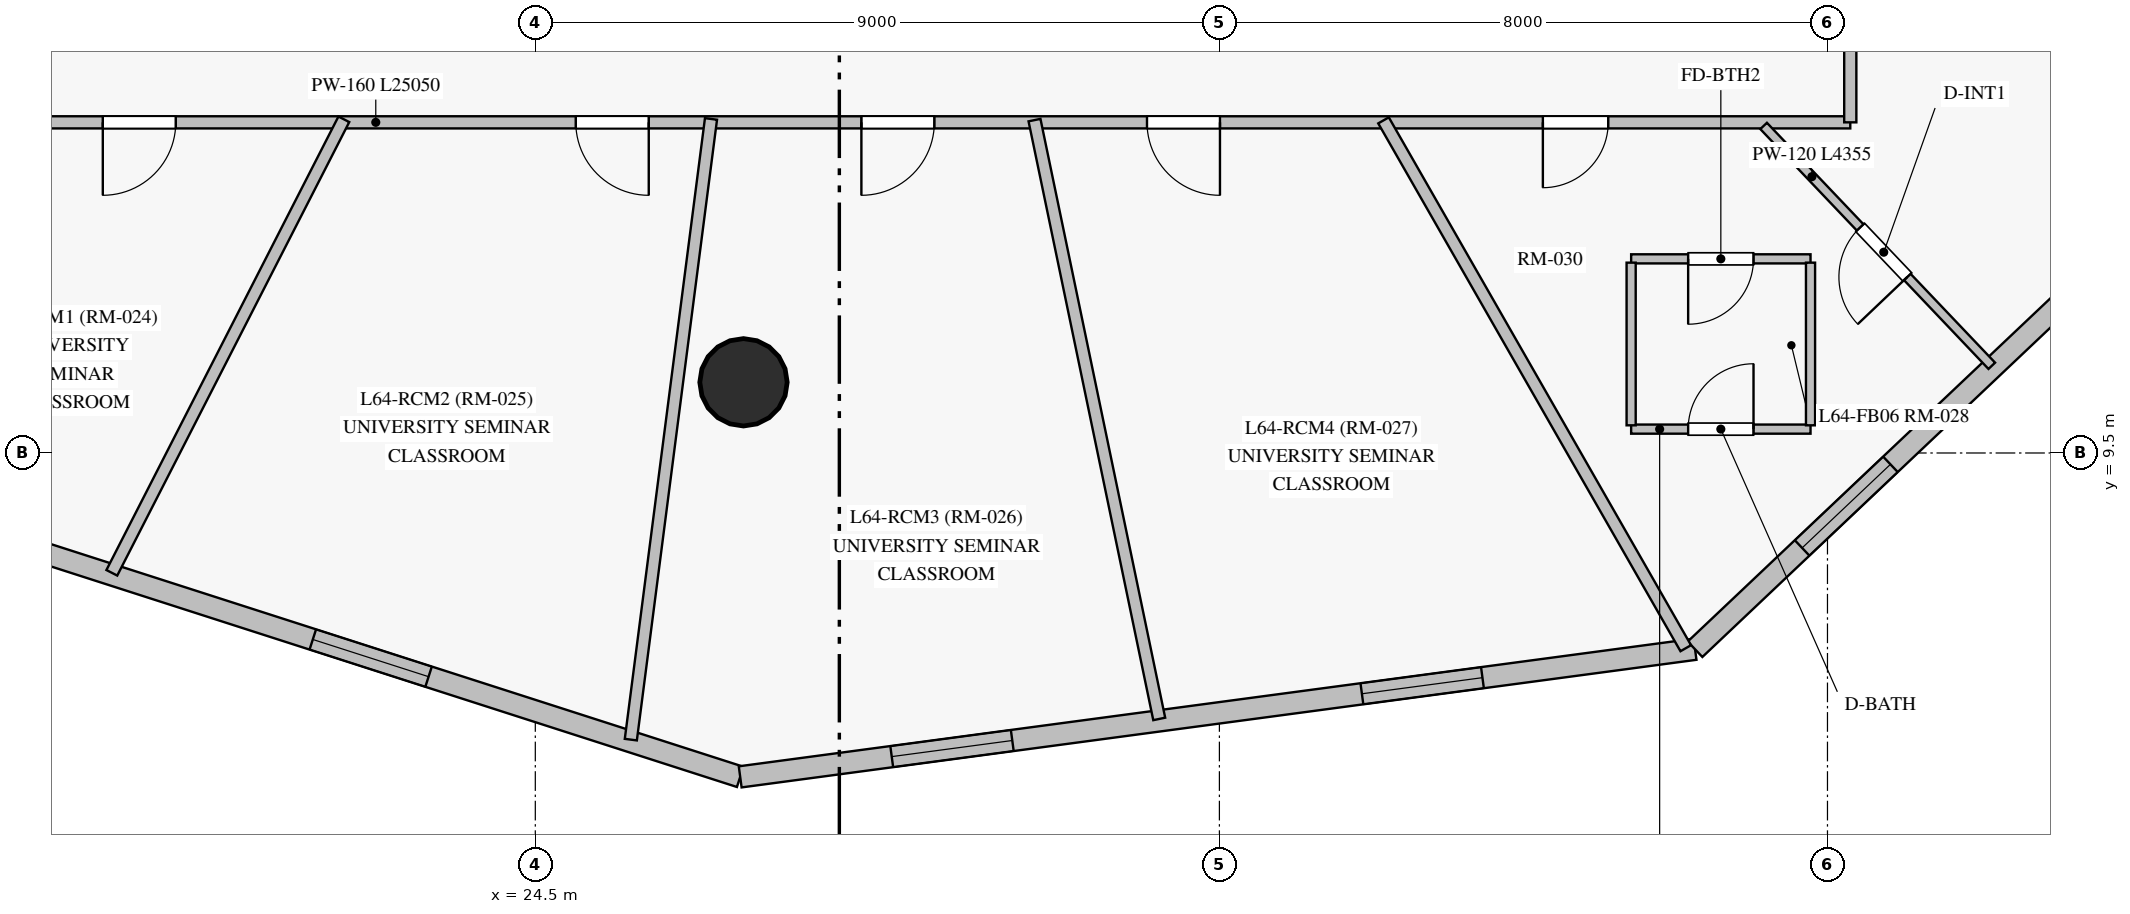
"""IFC4 building model, lengths in metres.
Left out: names, types, materials, properties, quantities, classifications, styles, units other than length and angle.
Written with IfcOpenShell. Run it as: python <this file> out.ifc"""

import sys

from ifc_helpers import new_model, si_unit, direction, frame, frame_2d, origin, origin_with_axes, origin_2d, place, context, subcontext, project, spatial, rectangle, circle, extrude, source, transform, mapped, element, fill, save


model = new_model("IFC4")
c1 = context("Model", 3, precision=1e-05, world=origin(), true_north=direction((0.0, 1.0)))
c2 = subcontext(c1, "Body", "Model", "MODEL_VIEW")
j1 = project(units=[si_unit("LENGTHUNIT", "METRE"), si_unit("PLANEANGLEUNIT", "RADIAN")], contexts=[c1])
p1 = place(None, origin())
s1 = spatial("IfcSite", under=j1, at=p1, CompositionType="ELEMENT")
p2 = place(p1, origin())
s2 = spatial("IfcBuilding", under=s1, at=p2, CompositionType="ELEMENT")
p3 = place(p2, frame((0.0, 0.0, 219.95)))
s3 = spatial("IfcBuildingStorey", under=s2, at=p3, CompositionType="ELEMENT", Elevation=219.95)
m1 = source(origin_with_axes(), c2, "Body", "SweptSolid", [
    extrude(circle(Radius=0.575, at=origin_2d()), origin(), (0.0, 0.0, 1.0), 3.05),
])
p4 = place(p3, frame((27.239, 10.43, 0.0), z_axis=(0.0, 0.0, 1.0), x_axis=(1.0, 0.0, 0.0)))
e1 = element("IfcColumn", 1, at=p4, inside=s3, PredefinedType="COLUMN", context=c2, shape_type="MappedRepresentation", body=[
    mapped(m1, transform((0.0, 0.0, 0.0), scale=1.0)),
])
p5 = place(p3, frame((18.019, 8.189, 0.0), z_axis=(0.0, 0.0, 1.0), x_axis=(0.95200774136, -0.306073945951, 0.0)))
e2 = element("IfcWall", 2, at=p5, inside=s3, PredefinedType="SOLIDWALL", context=c2, shape_type="SweptSolid", body=[
    extrude(rectangle(XDim=9.64, YDim=0.28, at=frame_2d((4.82, 0.0))), origin(), (0.0, 0.0, 1.0), 2.85),
])
p6 = place(p5, frame((3.733, 0.0, 0.85)))
e3 = element("IfcOpeningElement", 3, at=p6, cuts=e2, PredefinedType="OPENING", context=c2, shape_type="SweptSolid", body=[
    extrude(rectangle(XDim=1.6, YDim=1.6, at=frame_2d((0.8, 0.8))), frame((0.0, 0.15, 0.0), z_axis=(0.0, -1.0, 0.0), x_axis=(1.0, 0.0, 0.0)), (0.0, 0.0, 1.0), 0.3),
])
p7 = place(p3, frame((27.196, 5.239, 0.0), z_axis=(0.0, 0.0, 1.0), x_axis=(0.991186634331, 0.132472849758, 0.0)))
e4 = element("IfcWall", 4, at=p7, inside=s3, PredefinedType="SOLIDWALL", context=c2, shape_type="SweptSolid", body=[
    extrude(rectangle(XDim=12.674, YDim=0.28, at=frame_2d((6.337, 0.0))), origin(), (0.0, 0.0, 1.0), 2.85),
])
p8 = place(p7, frame((2.011, 0.0, 0.85)))
e5 = element("IfcOpeningElement", 5, at=p8, cuts=e4, PredefinedType="OPENING", context=c2, shape_type="SweptSolid", body=[
    extrude(rectangle(XDim=1.6, YDim=1.6, at=frame_2d((0.8, 0.8))), frame((0.0, 0.15, 0.0), z_axis=(0.0, -1.0, 0.0), x_axis=(1.0, 0.0, 0.0)), (0.0, 0.0, 1.0), 0.3),
])
p9 = place(p7, frame((8.252, 0.0, 0.85)))
e6 = element("IfcOpeningElement", 6, at=p9, cuts=e4, PredefinedType="OPENING", context=c2, shape_type="SweptSolid", body=[
    extrude(rectangle(XDim=1.6, YDim=1.6, at=frame_2d((0.8, 0.8))), frame((0.0, 0.15, 0.0), z_axis=(0.0, -1.0, 0.0), x_axis=(1.0, 0.0, 0.0)), (0.0, 0.0, 1.0), 0.3),
])
p10 = place(p3, frame((39.758, 6.918, 0.0), z_axis=(0.0, 0.0, 1.0), x_axis=(0.726306750321, 0.687370718345, 0.0)))
e7 = element("IfcWall", 7, at=p10, inside=s3, PredefinedType="SOLIDWALL", context=c2, shape_type="SweptSolid", body=[
    extrude(rectangle(XDim=9.619, YDim=0.28, at=frame_2d((4.809, 0.0))), origin(), (0.0, 0.0, 1.0), 2.85),
])
p11 = place(p10, frame((1.939, 0.0, 0.85)))
e8 = element("IfcOpeningElement", 8, at=p11, cuts=e7, PredefinedType="OPENING", context=c2, shape_type="SweptSolid", body=[
    extrude(rectangle(XDim=1.6, YDim=1.6, at=frame_2d((0.8, 0.8))), frame((0.0, 0.15, 0.0), z_axis=(0.0, -1.0, 0.0), x_axis=(1.0, 0.0, 0.0)), (0.0, 0.0, 1.0), 0.3),
])
p12 = place(p10, frame((6.669, 0.0, 0.85)))
e9 = element("IfcOpeningElement", 9, at=p12, cuts=e7, PredefinedType="OPENING", context=c2, shape_type="SweptSolid", body=[
    extrude(rectangle(XDim=1.6, YDim=1.6, at=frame_2d((0.8, 0.8))), frame((0.0, 0.15, 0.0), z_axis=(0.0, -1.0, 0.0), x_axis=(1.0, 0.0, 0.0)), (0.0, 0.0, 1.0), 0.3),
])
p13 = place(p3, frame((41.8, 13.85, 0.0), z_axis=(0.0, 0.0, 1.0), x_axis=(-1.0, 0.0, 0.0)))
e10 = element("IfcWall", 10, at=p13, inside=s3, PredefinedType="PARTITIONING", context=c2, shape_type="SweptSolid", body=[
    extrude(rectangle(XDim=25.05, YDim=0.16, at=frame_2d((12.525, 0.0))), origin(), (0.0, 0.0, 1.0), 2.3),
])
p14 = place(p13, frame((22.03, 0.0, 0.0)))
e11 = element("IfcOpeningElement", 11, at=p14, cuts=e10, PredefinedType="OPENING", context=c2, shape_type="SweptSolid", body=[
    extrude(rectangle(XDim=0.96, YDim=2.15, at=frame_2d((0.48, 1.075))), frame((0.0, 0.09, 0.0), z_axis=(0.0, -1.0, 0.0), x_axis=(1.0, 0.0, 0.0)), (0.0, 0.0, 1.0), 0.18),
])
p15 = place(p13, frame((15.808, 0.0, 0.0)))
e12 = element("IfcOpeningElement", 12, at=p15, cuts=e10, PredefinedType="OPENING", context=c2, shape_type="SweptSolid", body=[
    extrude(rectangle(XDim=0.96, YDim=2.15, at=frame_2d((0.48, 1.075))), frame((0.0, 0.09, 0.0), z_axis=(0.0, -1.0, 0.0), x_axis=(1.0, 0.0, 0.0)), (0.0, 0.0, 1.0), 0.18),
])
p16 = place(p13, frame((12.05, 0.0, 0.0)))
e13 = element("IfcOpeningElement", 13, at=p16, cuts=e10, PredefinedType="OPENING", context=c2, shape_type="SweptSolid", body=[
    extrude(rectangle(XDim=0.96, YDim=2.15, at=frame_2d((0.48, 1.075))), frame((0.0, 0.09, 0.0), z_axis=(0.0, -1.0, 0.0), x_axis=(1.0, 0.0, 0.0)), (0.0, 0.0, 1.0), 0.18),
])
p17 = place(p13, frame((8.292, 0.0, 0.0)))
e14 = element("IfcOpeningElement", 14, at=p17, cuts=e10, PredefinedType="OPENING", context=c2, shape_type="SweptSolid", body=[
    extrude(rectangle(XDim=0.96, YDim=2.15, at=frame_2d((0.48, 1.075))), frame((0.0, 0.09, 0.0), z_axis=(0.0, -1.0, 0.0), x_axis=(1.0, 0.0, 0.0)), (0.0, 0.0, 1.0), 0.18),
])
p18 = place(p13, frame((3.184, 0.0, 0.0)))
e15 = element("IfcOpeningElement", 15, at=p18, cuts=e10, PredefinedType="OPENING", context=c2, shape_type="SweptSolid", body=[
    extrude(rectangle(XDim=0.86, YDim=2.04, at=frame_2d((0.43, 1.02))), frame((0.0, 0.09, 0.0), z_axis=(0.0, -1.0, 0.0), x_axis=(1.0, 0.0, 0.0)), (0.0, 0.0, 1.0), 0.18),
])
p19 = place(p3, frame((41.8, 33.45, 0.0), z_axis=(0.0, 0.0, 1.0), x_axis=(0.0, -1.0, 0.0)))
e16 = element("IfcWall", 16, at=p19, inside=s3, PredefinedType="PARTITIONING", context=c2, shape_type="SweptSolid", body=[
    extrude(rectangle(XDim=19.6, YDim=0.16, at=frame_2d((9.8, 0.0))), origin(), (0.0, 0.0, 1.0), 2.3),
])
p20 = place(p19, frame((13.835, 0.0, 0.0)))
e17 = element("IfcOpeningElement", 17, at=p20, cuts=e16, PredefinedType="OPENING", context=c2, shape_type="SweptSolid", body=[
    extrude(rectangle(XDim=0.96, YDim=2.15, at=frame_2d((0.48, 1.075))), frame((0.0, 0.09, 0.0), z_axis=(0.0, -1.0, 0.0), x_axis=(1.0, 0.0, 0.0)), (0.0, 0.0, 1.0), 0.18),
])
p21 = place(p19, frame((10.934, 0.0, 0.0)))
e18 = element("IfcOpeningElement", 18, at=p21, cuts=e16, PredefinedType="OPENING", context=c2, shape_type="SweptSolid", body=[
    extrude(rectangle(XDim=0.96, YDim=2.15, at=frame_2d((0.48, 1.075))), frame((0.0, 0.09, 0.0), z_axis=(0.0, -1.0, 0.0), x_axis=(1.0, 0.0, 0.0)), (0.0, 0.0, 1.0), 0.18),
])
p22 = place(p19, frame((3.701, 0.0, 0.0)))
e19 = element("IfcOpeningElement", 19, at=p22, cuts=e16, PredefinedType="OPENING", context=c2, shape_type="SweptSolid", body=[
    extrude(rectangle(XDim=0.96, YDim=2.15, at=frame_2d((0.48, 1.075))), frame((0.0, 0.09, 0.0), z_axis=(0.0, -1.0, 0.0), x_axis=(1.0, 0.0, 0.0)), (0.0, 0.0, 1.0), 0.18),
])
p23 = place(p19, frame((15.685, 0.0, 0.0)))
e20 = element("IfcOpeningElement", 20, at=p23, cuts=e16, PredefinedType="OPENING", context=c2, shape_type="SweptSolid", body=[
    extrude(rectangle(XDim=0.86, YDim=2.04, at=frame_2d((0.43, 1.02))), frame((0.0, 0.09, 0.0), z_axis=(0.0, -1.0, 0.0), x_axis=(1.0, 0.0, 0.0)), (0.0, 0.0, 1.0), 0.18),
])
p24 = place(p3, frame((26.811, 13.895, 0.0), z_axis=(0.0, 0.0, 1.0), x_axis=(-0.128095527958, -0.99176183417, 0.0)))
e21 = element("IfcWall", 21, at=p24, inside=s3, PredefinedType="PARTITIONING", context=c2, shape_type="SweptSolid", body=[
    extrude(rectangle(XDim=8.234, YDim=0.16, at=frame_2d((4.117, 0.0))), origin(), (0.0, 0.0, 1.0), 2.35),
])
p25 = place(p3, frame((31.068, 13.879, 0.0), z_axis=(0.0, 0.0, 1.0), x_axis=(0.203904581613, -0.97899076686, 0.0)))
e22 = element("IfcWall", 22, at=p25, inside=s3, PredefinedType="PARTITIONING", context=c2, shape_type="SweptSolid", body=[
    extrude(rectangle(XDim=8.047, YDim=0.16, at=frame_2d((4.023, 0.0))), origin(), (0.0, 0.0, 1.0), 2.85),
])
p26 = place(p3, frame((35.659, 13.876, 0.0), z_axis=(0.0, 0.0, 1.0), x_axis=(0.496904293202, -0.867805348795, 0.0)))
e23 = element("IfcWall", 23, at=p26, inside=s3, PredefinedType="PARTITIONING", context=c2, shape_type="SweptSolid", body=[
    extrude(rectangle(XDim=8.002, YDim=0.16, at=frame_2d((4.001, 0.0))), origin(), (0.0, 0.0, 1.0), 2.85),
])
p27 = place(p3, frame((21.981, 13.89, 0.0), z_axis=(0.0, 0.0, 1.0), x_axis=(-0.455471104302, -0.890250567619, 0.0)))
e24 = element("IfcWall", 24, at=p27, inside=s3, PredefinedType="PARTITIONING", context=c2, shape_type="SweptSolid", body=[
    extrude(rectangle(XDim=6.702, YDim=0.16, at=frame_2d((3.351, 0.0))), origin(), (0.0, 0.0, 1.0), 2.85),
])
p28 = place(p3, frame((43.662, 10.647, 0.0), z_axis=(0.0, 0.0, 1.0), x_axis=(-0.689200128432, 0.724571033763, 0.0)))
e25 = element("IfcWall", 25, at=p28, inside=s3, PredefinedType="PARTITIONING", context=c2, shape_type="SweptSolid", body=[
    extrude(rectangle(XDim=4.355, YDim=0.12, at=frame_2d((2.178, 0.0))), origin(), (0.0, 0.0, 1.0), 2.85),
])
p29 = place(p28, frame((1.613, 0.0, 0.0)))
e26 = element("IfcOpeningElement", 26, at=p29, cuts=e25, PredefinedType="OPENING", context=c2, shape_type="SweptSolid", body=[
    extrude(rectangle(XDim=0.9, YDim=2.1, at=frame_2d((0.45, 1.05))), frame((0.0, 0.07, 0.0), z_axis=(0.0, -1.0, 0.0), x_axis=(1.0, 0.0, 0.0)), (0.0, 0.0, 1.0), 0.14),
])
p30 = place(p3, frame((38.917, 9.814, 0.0), z_axis=(0.0, 0.0, 1.0), x_axis=(1.0, 0.0, 0.0)))
e27 = element("IfcWall", 27, at=p30, inside=s3, PredefinedType="PARTITIONING", context=c2, shape_type="SweptSolid", body=[
    extrude(rectangle(XDim=2.36, YDim=0.12, at=frame_2d((1.18, 0.0))), origin(), (0.0, 0.0, 1.0), 2.85),
])
p31 = place(p30, frame((0.75, 0.0, 0.0)))
e28 = element("IfcOpeningElement", 28, at=p31, cuts=e27, PredefinedType="OPENING", context=c2, shape_type="SweptSolid", body=[
    extrude(rectangle(XDim=0.86, YDim=2.1, at=frame_2d((0.43, 1.05))), frame((0.0, 0.07, 0.0), z_axis=(0.0, -1.0, 0.0), x_axis=(1.0, 0.0, 0.0)), (0.0, 0.0, 1.0), 0.14),
])
p32 = place(p3, frame((41.277, 12.054, 0.0), z_axis=(0.0, 0.0, 1.0), x_axis=(-1.0, 0.0, 0.0)))
e29 = element("IfcWall", 29, at=p32, inside=s3, PredefinedType="PARTITIONING", context=c2, shape_type="SweptSolid", body=[
    extrude(rectangle(XDim=2.36, YDim=0.12, at=frame_2d((1.18, 0.0))), origin(), (0.0, 0.0, 1.0), 2.85),
])
p33 = place(p32, frame((0.75, 0.0, 0.0)))
e30 = element("IfcOpeningElement", 30, at=p33, cuts=e29, PredefinedType="OPENING", context=c2, shape_type="SweptSolid", body=[
    extrude(rectangle(XDim=0.86, YDim=2.04, at=frame_2d((0.43, 1.02))), frame((0.0, 0.07, 0.0), z_axis=(0.0, -1.0, 0.0), x_axis=(1.0, 0.0, 0.0)), (0.0, 0.0, 1.0), 0.14),
])
for number, where, z_axis, x_axis in (
    (31, (41.277, 9.864, 0.0), (0.0, 0.0, 1.0), (0.0, 1.0, 0.0)),
    (32, (38.917, 12.004, 0.0), (0.0, 0.0, 1.0), (0.0, -1.0, 0.0)),
):
    element("IfcWall", number, at=place(p3, frame(where, z_axis=z_axis, x_axis=x_axis)), inside=s3, PredefinedType="PARTITIONING", context=c2, shape_type="SweptSolid", body=[
        extrude(rectangle(XDim=2.14, YDim=0.12, at=frame_2d((1.07, 0.0))), origin(), (0.0, 0.0, 1.0), 2.85),
    ])
m2 = source(origin_with_axes(), c2, "Body", "SweptSolid", [
    extrude(rectangle(XDim=1.6, YDim=1.6, at=frame_2d((0.8, 0.8))), frame((0.0, 0.03, 0.0), z_axis=(0.0, -1.0, 0.0), x_axis=(1.0, 0.0, 0.0)), (0.0, 0.0, 1.0), 0.06),
])
p34 = place(p6, origin())
e33 = element("IfcWindow", 33, at=p34, inside=s3, PartitioningType="SINGLE_PANEL", PredefinedType="WINDOW", context=c2, shape_type="MappedRepresentation", body=[
    mapped(m2, transform((0.0, 0.0, 0.0), scale=1.0)),
])
fill(e3, e33)
p35 = place(p8, origin())
e34 = element("IfcWindow", 34, at=p35, inside=s3, PartitioningType="SINGLE_PANEL", PredefinedType="WINDOW", context=c2, shape_type="MappedRepresentation", body=[
    mapped(m2, transform((0.0, 0.0, 0.0), scale=1.0)),
])
fill(e5, e34)
p36 = place(p9, origin())
e35 = element("IfcWindow", 35, at=p36, inside=s3, PartitioningType="SINGLE_PANEL", PredefinedType="WINDOW", context=c2, shape_type="MappedRepresentation", body=[
    mapped(m2, transform((0.0, 0.0, 0.0), scale=1.0)),
])
fill(e6, e35)
p37 = place(p11, origin())
e36 = element("IfcWindow", 36, at=p37, inside=s3, PartitioningType="SINGLE_PANEL", PredefinedType="WINDOW", context=c2, shape_type="MappedRepresentation", body=[
    mapped(m2, transform((0.0, 0.0, 0.0), scale=1.0)),
])
fill(e8, e36)
m3 = source(origin_with_axes(), c2, "Body", "SweptSolid", [
    extrude(rectangle(XDim=0.86, YDim=2.1, at=frame_2d((0.43, 1.05))), frame((0.0, 0.025, 0.0), z_axis=(0.0, -1.0, 0.0), x_axis=(1.0, 0.0, 0.0)), (0.0, 0.0, 1.0), 0.05),
])
p38 = place(p31, origin())
e37 = element("IfcDoor", 37, at=p38, inside=s3, OperationType="SINGLE_SWING_RIGHT", PredefinedType="DOOR", context=c2, shape_type="MappedRepresentation", body=[
    mapped(m3, transform((0.0, 0.0, 0.0), scale=1.0)),
])
fill(e28, e37)
m4 = source(origin_with_axes(), c2, "Body", "SweptSolid", [
    extrude(rectangle(XDim=0.9, YDim=2.1, at=frame_2d((0.45, 1.05))), frame((0.0, 0.025, 0.0), z_axis=(0.0, -1.0, 0.0), x_axis=(1.0, 0.0, 0.0)), (0.0, 0.0, 1.0), 0.05),
])
p39 = place(p29, origin())
e38 = element("IfcDoor", 38, at=p39, inside=s3, OperationType="SINGLE_SWING_LEFT", PredefinedType="DOOR", context=c2, shape_type="MappedRepresentation", body=[
    mapped(m4, transform((0.0, 0.0, 0.0), scale=1.0)),
])
fill(e26, e38)
m5 = source(origin_with_axes(), c2, "Body", "SweptSolid", [
    extrude(rectangle(XDim=0.96, YDim=2.15, at=frame_2d((0.48, 1.075))), frame((0.0, 0.025, 0.0), z_axis=(0.0, -1.0, 0.0), x_axis=(1.0, 0.0, 0.0)), (0.0, 0.0, 1.0), 0.05),
])
p40 = place(p14, origin())
e39 = element("IfcDoor", 39, at=p40, inside=s3, OperationType="SINGLE_SWING_RIGHT", PredefinedType="DOOR", context=c2, shape_type="MappedRepresentation", body=[
    mapped(m5, transform((0.0, 0.0, 0.0), scale=1.0)),
])
fill(e11, e39)
p41 = place(p15, origin())
e40 = element("IfcDoor", 40, at=p41, inside=s3, OperationType="SINGLE_SWING_LEFT", PredefinedType="DOOR", context=c2, shape_type="MappedRepresentation", body=[
    mapped(m5, transform((0.0, 0.0, 0.0), scale=1.0)),
])
fill(e12, e40)
p42 = place(p16, origin())
e41 = element("IfcDoor", 41, at=p42, inside=s3, OperationType="SINGLE_SWING_RIGHT", PredefinedType="DOOR", context=c2, shape_type="MappedRepresentation", body=[
    mapped(m5, transform((0.0, 0.0, 0.0), scale=1.0)),
])
fill(e13, e41)
p43 = place(p17, origin())
e42 = element("IfcDoor", 42, at=p43, inside=s3, OperationType="SINGLE_SWING_LEFT", PredefinedType="DOOR", context=c2, shape_type="MappedRepresentation", body=[
    mapped(m5, transform((0.0, 0.0, 0.0), scale=1.0)),
])
fill(e14, e42)
m6 = source(origin_with_axes(), c2, "Body", "SweptSolid", [
    extrude(rectangle(XDim=0.86, YDim=2.04, at=frame_2d((0.43, 1.02))), frame((0.0, 0.025, 0.0), z_axis=(0.0, -1.0, 0.0), x_axis=(1.0, 0.0, 0.0)), (0.0, 0.0, 1.0), 0.05),
])
p44 = place(p33, origin())
e43 = element("IfcDoor", 43, at=p44, inside=s3, OperationType="SINGLE_SWING_RIGHT", PredefinedType="DOOR", context=c2, shape_type="MappedRepresentation", body=[
    mapped(m6, transform((0.0, 0.0, 0.0), scale=1.0)),
])
fill(e30, e43)
p45 = place(p18, origin())
e44 = element("IfcDoor", 44, at=p45, inside=s3, OperationType="SINGLE_SWING_RIGHT", PredefinedType="DOOR", context=c2, shape_type="MappedRepresentation", body=[
    mapped(m6, transform((0.0, 0.0, 0.0), scale=1.0)),
])
fill(e15, e44)
save(model, sys.argv[1])
